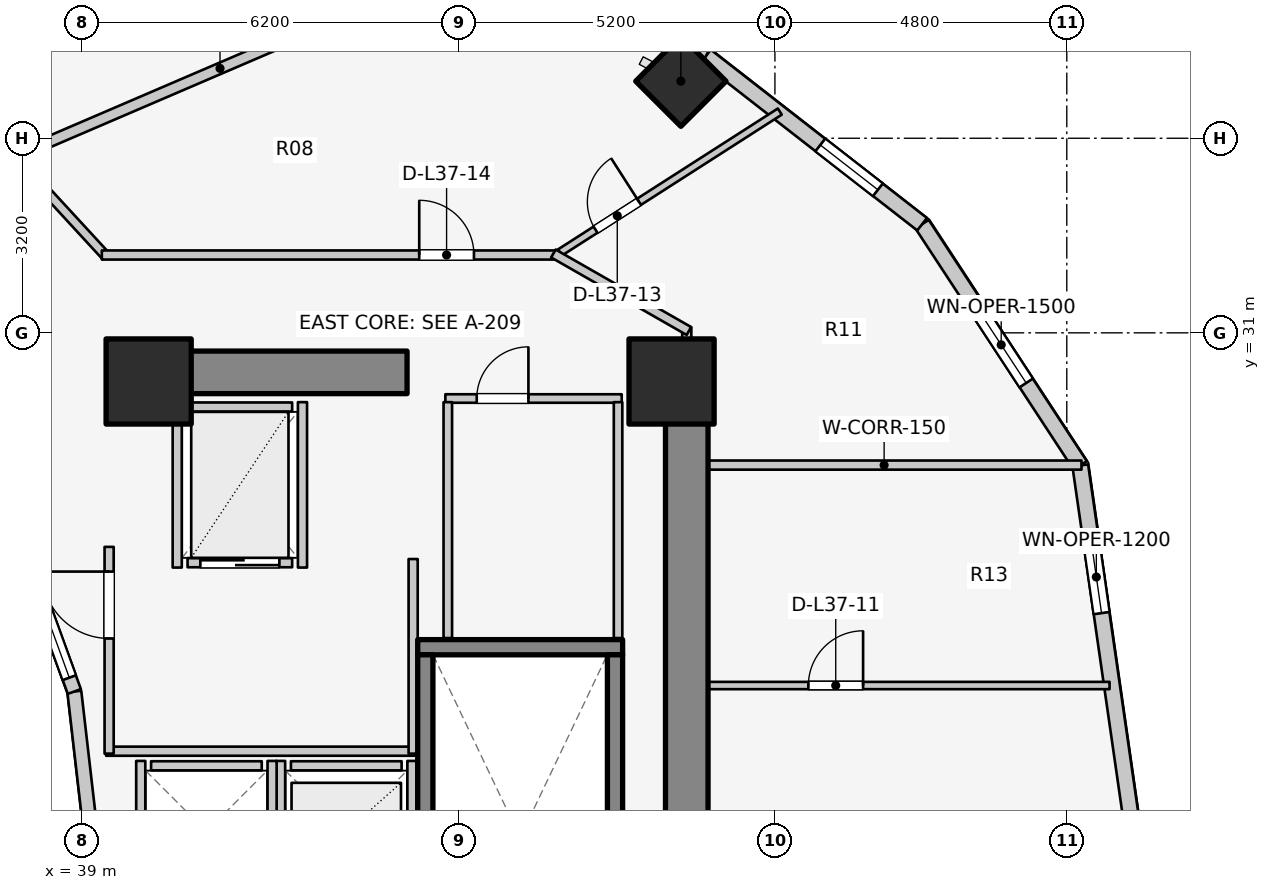
"""IFC4 building model, lengths in metres.
Left out: names, types, materials, properties, quantities, classifications, styles, units other than length and angle.
Written with IfcOpenShell. Run it as: python <this file> out.ifc"""

import sys

from ifc_helpers import new_model, si_unit, direction, frame, frame_2d, origin, origin_2d, place, context, subcontext, project, spatial, rectangle, extrude, element, fill, save


model = new_model("IFC4")
c1 = context("Model", 3, precision=1e-05, world=origin(), true_north=direction((0.0, 1.0)))
c2 = subcontext(c1, "Body", "Model", "MODEL_VIEW")
j1 = project(units=[si_unit("LENGTHUNIT", "METRE"), si_unit("PLANEANGLEUNIT", "RADIAN")], contexts=[c1])
p1 = place(None, origin())
s1 = spatial("IfcSite", under=j1, at=p1, CompositionType="ELEMENT")
p2 = place(p1, origin())
s2 = spatial("IfcBuilding", under=s1, at=p2, CompositionType="ELEMENT")
p3 = place(p2, frame((0.0, 0.0, 122.8)))
s3 = spatial("IfcBuildingStorey", under=s2, at=p3, CompositionType="ELEMENT", Elevation=122.8)
p4 = place(p3, frame((48.95, 17.05, 0.0), z_axis=(0.0, 0.0, 1.0), x_axis=(0.0, 1.0, 0.0)))
e1 = element("IfcWall", 1, at=p4, inside=s3, PredefinedType="SHEAR", context=c2, shape_type="SweptSolid", body=[
    extrude(rectangle(XDim=12.8, YDim=0.7, at=frame_2d((6.4, 0.0))), origin(), (0.0, 0.0, 1.0), 3.1),
])
p5 = place(p3, frame((39.85, 30.35, 0.0), z_axis=(0.0, 0.0, 1.0), x_axis=(1.0, 0.0, 0.0)))
e2 = element("IfcWall", 2, at=p5, inside=s3, PredefinedType="SHEAR", context=c2, shape_type="SweptSolid", body=[
    extrude(rectangle(XDim=4.5, YDim=0.7, at=frame_2d((2.25, 0.0))), origin(), (0.0, 0.0, 1.0), 3.1),
])
p6 = place(p3, frame((44.525, 25.83, 0.0), z_axis=(0.0, 0.0, 1.0), x_axis=(1.0, 0.0, 0.0)))
e3 = element("IfcWall", 3, at=p6, inside=s3, PredefinedType="SOLIDWALL", context=c2, shape_type="SweptSolid", body=[
    extrude(rectangle(XDim=3.37, YDim=0.25, at=frame_2d((1.685, 0.0))), origin(), (0.0, 0.0, 1.0), 3.1),
])
for number, where, z_axis, x_axis in (
    (4, (44.65, 17.895, 0.0), (0.0, 0.0, 1.0), (0.0, 1.0, 0.0)),
    (5, (47.77, 17.895, 0.0), (0.0, 0.0, 1.0), (0.0, 1.0, 0.0)),
):
    element("IfcWall", number, at=place(p3, frame(where, z_axis=z_axis, x_axis=x_axis)), inside=s3, PredefinedType="SOLIDWALL", context=c2, shape_type="SweptSolid", body=[
        extrude(rectangle(XDim=7.81, YDim=0.25, at=frame_2d((3.905, 0.0))), origin(), (0.0, 0.0, 1.0), 3.1),
    ])
for number, where, z_axis, x_axis in (
    (6, (48.7, 30.2, 0.0), (0.0, 0.0, 1.0), (1.0, 0.0, 0.0)),
    (7, (40.1, 30.2, 0.0), (0.0, 0.0, 1.0), (1.0, 0.0, 0.0)),
):
    element("IfcColumn", number, at=place(p3, frame(where, z_axis=z_axis, x_axis=x_axis)), inside=s3, PredefinedType="COLUMN", context=c2, shape_type="SweptSolid", body=[
        extrude(rectangle(XDim=1.4, YDim=1.4, at=origin_2d()), origin(), (0.0, 0.0, 1.0), 3.1),
    ])
p7 = place(p3, frame((48.853, 35.138, 0.0), z_axis=(0.0, 0.0, 1.0), x_axis=(0.707106781187, 0.707106781187, 0.0)))
e8 = element("IfcColumn", 8, at=p7, inside=s3, PredefinedType="COLUMN", context=c2, shape_type="SweptSolid", body=[
    extrude(rectangle(XDim=1.05, YDim=1.05, at=origin_2d()), origin(), (0.0, 0.0, 1.0), 3.1),
])
p8 = place(p3, frame((39.12, 23.0, 0.0), z_axis=(0.0, 0.0, 1.0), x_axis=(-0.114711713601, 0.993398823617, 0.0)))
e9 = element("IfcWall", 9, at=p8, inside=s3, PredefinedType="STANDARD", context=c2, shape_type="SweptSolid", body=[
    extrude(rectangle(XDim=2.115, YDim=0.23, at=frame_2d((1.058, 0.0))), origin(), (0.0, 0.0, 1.0), 2.84),
])
p9 = place(p3, frame((38.877, 25.102, 0.0), z_axis=(0.0, 0.0, 1.0), x_axis=(-0.341423187295, 0.93990968033, 0.0)))
e10 = element("IfcWall", 10, at=p9, inside=s3, PredefinedType="STANDARD", context=c2, shape_type="SweptSolid", body=[
    extrude(rectangle(XDim=2.084, YDim=0.23, at=frame_2d((1.042, 0.0))), origin(), (0.0, 0.0, 1.0), 2.84),
])
p10 = place(p9, frame((0.242, 0.0, 0.85)))
e11 = element("IfcOpeningElement", 11, at=p10, cuts=e10, PredefinedType="OPENING", context=c2, shape_type="SweptSolid", body=[
    extrude(rectangle(XDim=1.6, YDim=1.65, at=frame_2d((0.8, 0.825))), frame((0.0, 0.125, 0.0), z_axis=(0.0, -1.0, 0.0), x_axis=(1.0, 0.0, 0.0)), (0.0, 0.0, 1.0), 0.25),
])
p11 = place(p3, frame((56.26, 23.0, 0.0), z_axis=(0.0, 0.0, 1.0), x_axis=(-0.142572472068, 0.98978436551, 0.0)))
e12 = element("IfcWall", 12, at=p11, inside=s3, PredefinedType="STANDARD", context=c2, shape_type="SweptSolid", body=[
    extrude(rectangle(XDim=5.879, YDim=0.26, at=frame_2d((2.939, 0.0))), origin(), (0.0, 0.0, 1.0), 2.85),
])
p12 = place(p11, frame((3.426, 0.0, 0.75)))
e13 = element("IfcOpeningElement", 13, at=p12, cuts=e12, PredefinedType="OPENING", context=c2, shape_type="SweptSolid", body=[
    extrude(rectangle(XDim=1.2, YDim=1.5, at=frame_2d((0.6, 0.75))), frame((0.0, 0.14, 0.0), z_axis=(0.0, -1.0, 0.0), x_axis=(1.0, 0.0, 0.0)), (0.0, 0.0, 1.0), 0.28),
])
p13 = place(p3, frame((55.422, 28.819, 0.0), z_axis=(0.0, 0.0, 1.0), x_axis=(-0.548283220945, 0.836292717672, 0.0)))
e14 = element("IfcWall", 14, at=p13, inside=s3, PredefinedType="STANDARD", context=c2, shape_type="SweptSolid", body=[
    extrude(rectangle(XDim=4.744, YDim=0.26, at=frame_2d((2.372, 0.0))), origin(), (0.0, 0.0, 1.0), 2.85),
])
p14 = place(p13, frame((1.622, 0.0, 0.75)))
e15 = element("IfcOpeningElement", 15, at=p14, cuts=e14, PredefinedType="OPENING", context=c2, shape_type="SweptSolid", body=[
    extrude(rectangle(XDim=1.5, YDim=1.6, at=frame_2d((0.75, 0.8))), frame((0.0, 0.14, 0.0), z_axis=(0.0, -1.0, 0.0), x_axis=(1.0, 0.0, 0.0)), (0.0, 0.0, 1.0), 0.28),
])
p15 = place(p3, frame((52.821, 32.786, 0.0), z_axis=(0.0, 0.0, 1.0), x_axis=(-0.789127449954, 0.614229491094, 0.0)))
e16 = element("IfcWall", 16, at=p15, inside=s3, PredefinedType="STANDARD", context=c2, shape_type="SweptSolid", body=[
    extrude(rectangle(XDim=4.505, YDim=0.26, at=frame_2d((2.252, 0.0))), origin(), (0.0, 0.0, 1.0), 2.85),
])
p16 = place(p15, frame((0.922, 0.0, 0.75)))
e17 = element("IfcOpeningElement", 17, at=p16, cuts=e16, PredefinedType="OPENING", context=c2, shape_type="SweptSolid", body=[
    extrude(rectangle(XDim=1.2, YDim=1.5, at=frame_2d((0.6, 0.75))), frame((0.0, 0.14, 0.0), z_axis=(0.0, -1.0, 0.0), x_axis=(1.0, 0.0, 0.0)), (0.0, 0.0, 1.0), 0.28),
])
p17 = place(p3, frame((49.266, 35.553, 0.0), z_axis=(0.0, 0.0, 1.0), x_axis=(-0.883668636807, 0.4681129568, 0.0)))
e18 = element("IfcWall", 18, at=p17, inside=s3, PredefinedType="STANDARD", context=c2, shape_type="SweptSolid", body=[
    extrude(rectangle(XDim=4.631, YDim=0.26, at=frame_2d((2.316, 0.0))), origin(), (0.0, 0.0, 1.0), 2.85),
])
p18 = place(p3, frame((42.44, 23.88, 0.0), z_axis=(0.0, 0.0, 1.0), x_axis=(1.0, 0.0, 0.0)))
e19 = element("IfcWall", 19, at=p18, inside=s3, PredefinedType="SOLIDWALL", context=c2, shape_type="SweptSolid", body=[
    extrude(rectangle(XDim=1.82, YDim=0.15, at=frame_2d((0.91, 0.0))), origin(), (0.0, 0.0, 1.0), 2.855),
])
for number, where, z_axis, x_axis in (
    (20, (42.27, 21.64, 0.0), (0.0, 0.0, 1.0), (0.0, 1.0, 0.0)),
    (21, (44.43, 21.64, 0.0), (0.0, 0.0, 1.0), (0.0, 1.0, 0.0)),
):
    element("IfcWall", number, at=place(p3, frame(where, z_axis=z_axis, x_axis=x_axis)), inside=s3, PredefinedType="SOLIDWALL", context=c2, shape_type="SweptSolid", body=[
        extrude(rectangle(XDim=2.32, YDim=0.15, at=frame_2d((1.16, 0.0))), origin(), (0.0, 0.0, 1.0), 2.855),
    ])
p19 = place(p3, frame((40.14, 23.88, 0.0), z_axis=(0.0, 0.0, 1.0), x_axis=(1.0, 0.0, 0.0)))
e22 = element("IfcWall", 22, at=p19, inside=s3, PredefinedType="SOLIDWALL", context=c2, shape_type="SweptSolid", body=[
    extrude(rectangle(XDim=1.82, YDim=0.15, at=frame_2d((0.91, 0.0))), origin(), (0.0, 0.0, 1.0), 2.12),
])
p20 = place(p3, frame((39.97, 21.64, 0.0), z_axis=(0.0, 0.0, 1.0), x_axis=(0.0, 1.0, 0.0)))
e23 = element("IfcWall", 23, at=p20, inside=s3, PredefinedType="SOLIDWALL", context=c2, shape_type="SweptSolid", body=[
    extrude(rectangle(XDim=2.32, YDim=0.15, at=frame_2d((1.16, 0.0))), origin(), (0.0, 0.0, 1.0), 2.12),
])
p21 = place(p3, frame((42.13, 21.64, 0.0), z_axis=(0.0, 0.0, 1.0), x_axis=(0.0, 1.0, 0.0)))
e24 = element("IfcWall", 24, at=p21, inside=s3, PredefinedType="SOLIDWALL", context=c2, shape_type="SweptSolid", body=[
    extrude(rectangle(XDim=2.32, YDim=0.15, at=frame_2d((1.16, 0.0))), origin(), (0.0, 0.0, 1.0), 2.855),
])
p22 = place(p3, frame((40.74, 27.22, 0.0), z_axis=(0.0, 0.0, 1.0), x_axis=(1.0, 0.0, 0.0)))
e25 = element("IfcWall", 25, at=p22, inside=s3, PredefinedType="SOLIDWALL", context=c2, shape_type="SweptSolid", body=[
    extrude(rectangle(XDim=1.72, YDim=0.15, at=frame_2d((0.86, 0.0))), origin(), (0.0, 0.0, 1.0), 2.855),
])
p23 = place(p22, frame((0.21, 0.0, 0.0)))
e26 = element("IfcOpeningElement", 26, at=p23, cuts=e25, PredefinedType="OPENING", context=c2, shape_type="SweptSolid", body=[
    extrude(rectangle(XDim=1.3, YDim=2.1, at=frame_2d((0.65, 1.05))), frame((0.0, 0.085, 0.0), z_axis=(0.0, -1.0, 0.0), x_axis=(1.0, 0.0, 0.0)), (0.0, 0.0, 1.0), 0.17),
])
p24 = place(p3, frame((40.74, 29.78, 0.0), z_axis=(0.0, 0.0, 1.0), x_axis=(1.0, 0.0, 0.0)))
e27 = element("IfcWall", 27, at=p24, inside=s3, PredefinedType="SOLIDWALL", context=c2, shape_type="SweptSolid", body=[
    extrude(rectangle(XDim=1.72, YDim=0.15, at=frame_2d((0.86, 0.0))), origin(), (0.0, 0.0, 1.0), 2.855),
])
for number, where, z_axis, x_axis in (
    (28, (40.57, 27.14, 0.0), (0.0, 0.0, 1.0), (0.0, 1.0, 0.0)),
    (29, (42.63, 27.14, 0.0), (0.0, 0.0, 1.0), (0.0, 1.0, 0.0)),
):
    element("IfcWall", number, at=place(p3, frame(where, z_axis=z_axis, x_axis=x_axis)), inside=s3, PredefinedType="SOLIDWALL", context=c2, shape_type="SweptSolid", body=[
        extrude(rectangle(XDim=2.72, YDim=0.15, at=frame_2d((1.36, 0.0))), origin(), (0.0, 0.0, 1.0), 2.855),
    ])
p25 = place(p3, frame((39.4, 24.12, 0.0), z_axis=(0.0, 0.0, 1.0), x_axis=(1.0, 0.0, 0.0)))
e30 = element("IfcWall", 30, at=p25, inside=s3, PredefinedType="PARTITIONING", context=c2, shape_type="SweptSolid", body=[
    extrude(rectangle(XDim=5.08, YDim=0.15, at=frame_2d((2.54, 0.0))), origin(), (0.0, 0.0, 1.0), 2.12),
])
p26 = place(p3, frame((44.45, 24.08, 0.0), z_axis=(0.0, 0.0, 1.0), x_axis=(0.0, 1.0, 0.0)))
e31 = element("IfcWall", 31, at=p26, inside=s3, PredefinedType="PARTITIONING", context=c2, shape_type="SweptSolid", body=[
    extrude(rectangle(XDim=3.2, YDim=0.15, at=frame_2d((1.6, 0.0))), origin(), (0.0, 0.0, 1.0), 2.855),
])
p27 = place(p3, frame((39.45, 24.08, 0.0), z_axis=(0.0, 0.0, 1.0), x_axis=(0.0, 1.0, 0.0)))
e32 = element("IfcWall", 32, at=p27, inside=s3, PredefinedType="PARTITIONING", context=c2, shape_type="SweptSolid", body=[
    extrude(rectangle(XDim=3.4, YDim=0.15, at=frame_2d((1.7, 0.0))), origin(), (0.0, 0.0, 1.0), 2.855),
])
p28 = place(p27, frame((1.894, 0.0, 0.0)))
e33 = element("IfcOpeningElement", 33, at=p28, cuts=e32, PredefinedType="OPENING", context=c2, shape_type="SweptSolid", body=[
    extrude(rectangle(XDim=1.1, YDim=2.1, at=frame_2d((0.55, 1.05))), frame((0.0, 0.085, 0.0), z_axis=(0.0, -1.0, 0.0), x_axis=(1.0, 0.0, 0.0)), (0.0, 0.0, 1.0), 0.17),
])
p29 = place(p3, frame((44.98, 29.92, 0.0), z_axis=(0.0, 0.0, 1.0), x_axis=(1.0, 0.0, 0.0)))
e34 = element("IfcWall", 34, at=p29, inside=s3, PredefinedType="PLUMBINGWALL", context=c2, shape_type="SweptSolid", body=[
    extrude(rectangle(XDim=2.9, YDim=0.14, at=frame_2d((1.45, 0.0))), origin(), (0.0, 0.0, 1.0), 2.855),
])
p30 = place(p29, frame((0.516, 0.0, 0.0)))
e35 = element("IfcOpeningElement", 35, at=p30, cuts=e34, PredefinedType="OPENING", context=c2, shape_type="SweptSolid", body=[
    extrude(rectangle(XDim=0.85, YDim=2.05, at=frame_2d((0.425, 1.025))), frame((0.0, 0.08, 0.0), z_axis=(0.0, -1.0, 0.0), x_axis=(1.0, 0.0, 0.0)), (0.0, 0.0, 1.0), 0.16),
])
for number, where, z_axis, x_axis in (
    (36, (45.02, 25.98, 0.0), (0.0, 0.0, 1.0), (0.0, 1.0, 0.0)),
    (37, (47.82, 25.98, 0.0), (0.0, 0.0, 1.0), (0.0, 1.0, 0.0)),
):
    element("IfcWall", number, at=place(p3, frame(where, z_axis=z_axis, x_axis=x_axis)), inside=s3, PredefinedType="PLUMBINGWALL", context=c2, shape_type="SweptSolid", body=[
        extrude(rectangle(XDim=3.88, YDim=0.14, at=frame_2d((1.94, 0.0))), origin(), (0.0, 0.0, 1.0), 2.855),
    ])
p31 = place(p3, frame((48.95, 28.825, 0.0), z_axis=(0.0, 0.0, 1.0), x_axis=(1.0, 0.0, 0.0)))
e38 = element("IfcWall", 38, at=p31, inside=s3, PredefinedType="PARTITIONING", context=c2, shape_type="SweptSolid", body=[
    extrude(rectangle(XDim=6.492, YDim=0.15, at=frame_2d((3.246, 0.0))), origin(), (0.0, 0.0, 1.0), 2.855),
])
p32 = place(p3, frame((48.95, 25.2, 0.0), z_axis=(0.0, 0.0, 1.0), x_axis=(1.0, 0.0, 0.0)))
e39 = element("IfcWall", 39, at=p32, inside=s3, PredefinedType="MOVABLE", context=c2, shape_type="SweptSolid", body=[
    extrude(rectangle(XDim=6.953, YDim=0.12, at=frame_2d((3.477, 0.0))), origin(), (0.0, 0.0, 1.0), 2.855),
])
p33 = place(p32, frame((2.0, 0.0, 0.0)))
e40 = element("IfcOpeningElement", 40, at=p33, cuts=e39, PredefinedType="OPENING", context=c2, shape_type="SweptSolid", body=[
    extrude(rectangle(XDim=0.9, YDim=2.1, at=frame_2d((0.45, 1.05))), frame((0.0, 0.07, 0.0), z_axis=(0.0, -1.0, 0.0), x_axis=(1.0, 0.0, 0.0)), (0.0, 0.0, 1.0), 0.14),
])
p34 = place(p3, frame((48.95, 29.8, 0.0), z_axis=(0.0, 0.0, 1.0), x_axis=(0.0, 1.0, 0.0)))
e41 = element("IfcWall", 41, at=p34, inside=s3, PredefinedType="PARTITIONING", context=c2, shape_type="SweptSolid", body=[
    extrude(rectangle(XDim=1.29, YDim=0.15, at=frame_2d((0.645, 0.0))), origin(), (0.0, 0.0, 1.0), 2.142),
])
p35 = place(p3, frame((46.758, 32.253, 0.0), z_axis=(0.0, 0.0, 1.0), x_axis=(0.841897149708, 0.539638016928, 0.0)))
e42 = element("IfcWall", 42, at=p35, inside=s3, PredefinedType="MOVABLE", context=c2, shape_type="SweptSolid", body=[
    extrude(rectangle(XDim=4.421, YDim=0.12, at=frame_2d((2.211, 0.0))), origin(), (0.0, 0.0, 1.0), 2.142),
])
p36 = place(p35, frame((0.821, 0.0, 0.0)))
e43 = element("IfcOpeningElement", 43, at=p36, cuts=e42, PredefinedType="OPENING", context=c2, shape_type="SweptSolid", body=[
    extrude(rectangle(XDim=0.85, YDim=2.05, at=frame_2d((0.425, 1.025))), frame((0.0, 0.07, 0.0), z_axis=(0.0, -1.0, 0.0), x_axis=(1.0, 0.0, 0.0)), (0.0, 0.0, 1.0), 0.14),
])
p37 = place(p3, frame((37.928, 33.856, 0.0), z_axis=(0.0, 0.0, 1.0), x_axis=(0.677579737957, -0.735449317567, 0.0)))
e44 = element("IfcWall", 44, at=p37, inside=s3, PredefinedType="PARTITIONING", context=c2, shape_type="SweptSolid", body=[
    extrude(rectangle(XDim=2.173, YDim=0.15, at=frame_2d((1.086, 0.0))), origin(), (0.0, 0.0, 1.0), 2.272),
])
p38 = place(p3, frame((39.33, 32.28, 0.0), z_axis=(0.0, 0.0, 1.0), x_axis=(1.0, 0.0, 0.0)))
e45 = element("IfcWall", 45, at=p38, inside=s3, PredefinedType="PARTITIONING", context=c2, shape_type="SweptSolid", body=[
    extrude(rectangle(XDim=7.52, YDim=0.15, at=frame_2d((3.76, 0.0))), origin(), (0.0, 0.0, 1.0), 2.272),
])
p39 = place(p38, frame((5.22, 0.0, 0.0)))
e46 = element("IfcOpeningElement", 46, at=p39, cuts=e45, PredefinedType="OPENING", context=c2, shape_type="SweptSolid", body=[
    extrude(rectangle(XDim=0.9, YDim=2.1, at=frame_2d((0.45, 1.05))), frame((0.0, 0.085, 0.0), z_axis=(0.0, -1.0, 0.0), x_axis=(1.0, 0.0, 0.0)), (0.0, 0.0, 1.0), 0.17),
])
p40 = place(p3, frame((46.757, 32.305, 0.0), z_axis=(0.0, 0.0, 1.0), x_axis=(0.867991349648, -0.496579315857, 0.0)))
e47 = element("IfcWall", 47, at=p40, inside=s3, PredefinedType="PARTITIONING", context=c2, shape_type="SweptSolid", body=[
    extrude(rectangle(XDim=2.567, YDim=0.15, at=frame_2d((1.283, 0.0))), origin(), (0.0, 0.0, 1.0), 2.142),
])
p41 = place(p3, frame((37.941, 33.918, 0.0), z_axis=(0.0, 0.0, 1.0), x_axis=(0.918836579087, 0.394638240584, 0.0)))
e48 = element("IfcWall", 48, at=p41, inside=s3, PredefinedType="PARTITIONING", context=c2, shape_type="SweptSolid", body=[
    extrude(rectangle(XDim=7.253, YDim=0.18, at=frame_2d((3.626, 0.0))), origin(), (0.0, 0.0, 1.0), 2.272),
])
p42 = place(p10, origin())
e49 = element("IfcWindow", 49, at=p42, inside=s3, PartitioningType="SINGLE_PANEL", PredefinedType="WINDOW", context=c2, shape_type="SweptSolid", body=[
    extrude(rectangle(XDim=1.6, YDim=1.65, at=frame_2d((0.8, 0.825))), frame((0.0, 0.03, 0.0), z_axis=(0.0, -1.0, 0.0), x_axis=(1.0, 0.0, 0.0)), (0.0, 0.0, 1.0), 0.06),
])
fill(e11, e49)
p43 = place(p12, origin())
e50 = element("IfcWindow", 50, at=p43, inside=s3, PartitioningType="SINGLE_PANEL", PredefinedType="WINDOW", context=c2, shape_type="SweptSolid", body=[
    extrude(rectangle(XDim=1.2, YDim=1.5, at=frame_2d((0.6, 0.75))), frame((0.0, 0.03, 0.0), z_axis=(0.0, -1.0, 0.0), x_axis=(1.0, 0.0, 0.0)), (0.0, 0.0, 1.0), 0.06),
])
fill(e13, e50)
p44 = place(p14, origin())
e51 = element("IfcWindow", 51, at=p44, inside=s3, PartitioningType="SINGLE_PANEL", PredefinedType="WINDOW", context=c2, shape_type="SweptSolid", body=[
    extrude(rectangle(XDim=1.5, YDim=1.6, at=frame_2d((0.75, 0.8))), frame((0.0, 0.03, 0.0), z_axis=(0.0, -1.0, 0.0), x_axis=(1.0, 0.0, 0.0)), (0.0, 0.0, 1.0), 0.06),
])
fill(e15, e51)
p45 = place(p16, origin())
e52 = element("IfcWindow", 52, at=p45, inside=s3, PartitioningType="SINGLE_PANEL", PredefinedType="WINDOW", context=c2, shape_type="SweptSolid", body=[
    extrude(rectangle(XDim=1.2, YDim=1.5, at=frame_2d((0.6, 0.75))), frame((0.0, 0.03, 0.0), z_axis=(0.0, -1.0, 0.0), x_axis=(1.0, 0.0, 0.0)), (0.0, 0.0, 1.0), 0.06),
])
fill(e17, e52)
p46 = place(p23, origin())
e53 = element("IfcDoor", 53, at=p46, inside=s3, OperationType="DOUBLE_DOOR_SLIDING", PredefinedType="DOOR", context=c2, shape_type="SweptSolid", body=[
    extrude(rectangle(XDim=1.3, YDim=2.1, at=frame_2d((0.65, 1.05))), frame((0.0, 0.025, 0.0), z_axis=(0.0, -1.0, 0.0), x_axis=(1.0, 0.0, 0.0)), (0.0, 0.0, 1.0), 0.05),
])
fill(e26, e53)
p47 = place(p28, origin())
e54 = element("IfcDoor", 54, at=p47, inside=s3, OperationType="SINGLE_SWING_RIGHT", PredefinedType="DOOR", context=c2, shape_type="SweptSolid", body=[
    extrude(rectangle(XDim=1.1, YDim=2.1, at=frame_2d((0.55, 1.05))), frame((0.0, 0.025, 0.0), z_axis=(0.0, -1.0, 0.0), x_axis=(1.0, 0.0, 0.0)), (0.0, 0.0, 1.0), 0.05),
])
fill(e33, e54)
p48 = place(p30, origin())
e55 = element("IfcDoor", 55, at=p48, inside=s3, OperationType="SINGLE_SWING_RIGHT", PredefinedType="DOOR", context=c2, shape_type="SweptSolid", body=[
    extrude(rectangle(XDim=0.85, YDim=2.05, at=frame_2d((0.425, 1.025))), frame((0.0, 0.025, 0.0), z_axis=(0.0, -1.0, 0.0), x_axis=(1.0, 0.0, 0.0)), (0.0, 0.0, 1.0), 0.05),
])
fill(e35, e55)
p49 = place(p33, origin())
e56 = element("IfcDoor", 56, at=p49, inside=s3, OperationType="SINGLE_SWING_RIGHT", PredefinedType="DOOR", context=c2, shape_type="SweptSolid", body=[
    extrude(rectangle(XDim=0.9, YDim=2.1, at=frame_2d((0.45, 1.05))), frame((0.0, 0.025, 0.0), z_axis=(0.0, -1.0, 0.0), x_axis=(1.0, 0.0, 0.0)), (0.0, 0.0, 1.0), 0.05),
])
fill(e40, e56)
p50 = place(p36, origin())
e57 = element("IfcDoor", 57, at=p50, inside=s3, OperationType="SINGLE_SWING_RIGHT", PredefinedType="DOOR", context=c2, shape_type="SweptSolid", body=[
    extrude(rectangle(XDim=0.85, YDim=2.05, at=frame_2d((0.425, 1.025))), frame((0.0, 0.025, 0.0), z_axis=(0.0, -1.0, 0.0), x_axis=(1.0, 0.0, 0.0)), (0.0, 0.0, 1.0), 0.05),
])
fill(e43, e57)
p51 = place(p39, origin())
e58 = element("IfcDoor", 58, at=p51, inside=s3, OperationType="SINGLE_SWING_LEFT", PredefinedType="DOOR", context=c2, shape_type="SweptSolid", body=[
    extrude(rectangle(XDim=0.9, YDim=2.1, at=frame_2d((0.45, 1.05))), frame((0.0, 0.025, 0.0), z_axis=(0.0, -1.0, 0.0), x_axis=(1.0, 0.0, 0.0)), (0.0, 0.0, 1.0), 0.05),
])
fill(e46, e58)
save(model, sys.argv[1])
